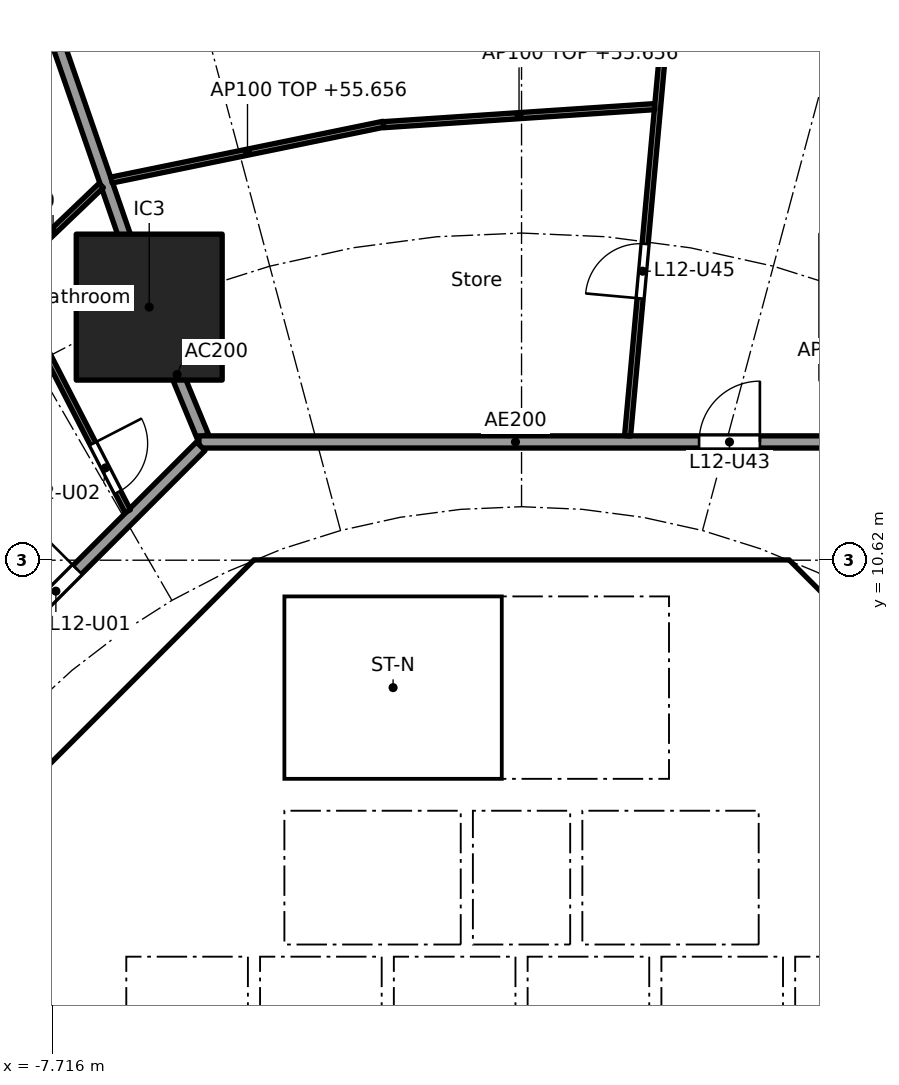
"""IFC4 building model, lengths in metres.
Left out: names, types, materials, properties, quantities, classifications, styles, units other than length and angle.
Written with IfcOpenShell. Run it as: python <this file> out.ifc"""

import sys

from ifc_helpers import new_model, si_unit, direction, frame, frame_2d, origin, origin_2d, place, context, subcontext, project, spatial, polyline, rectangle, outline, extrude, element, fill, save


model = new_model("IFC4")
c1 = context("Model", 3, precision=1e-05, world=origin(), true_north=direction((0.0, 1.0)))
c2 = subcontext(c1, "Body", "Model", "MODEL_VIEW")
j1 = project(units=[si_unit("LENGTHUNIT", "METRE"), si_unit("PLANEANGLEUNIT", "RADIAN")], contexts=[c1])
p1 = place(None, origin())
s1 = spatial("IfcSite", under=j1, at=p1, CompositionType="ELEMENT")
p2 = place(p1, origin())
s2 = spatial("IfcBuilding", under=s1, at=p2, CompositionType="ELEMENT")
p3 = place(p2, frame((0.0, 0.0, 52.9)))
s3 = spatial("IfcBuildingStorey", under=s2, at=p3, CompositionType="ELEMENT", Elevation=52.9)
p4 = place(p3, frame((-6.123, 14.782, 0.0), z_axis=(0.0, 0.0, 1.0), x_axis=(1.0, 0.0, 0.0)))
e1 = element("IfcColumn", 1, at=p4, inside=s3, PredefinedType="COLUMN", context=c2, shape_type="SweptSolid", body=[
    extrude(rectangle(XDim=2.4, YDim=2.4, at=origin_2d()), origin(), (0.0, 0.0, 1.0), 3.7),
])
p5 = place(p3, frame((9.988, 4.613, 0.0), z_axis=(0.0, 0.0, 1.0), x_axis=(-0.707106781187, 0.707106781187, 0.0)))
e2 = element("IfcWall", 2, at=p5, inside=s3, PredefinedType="SHEAR", context=c2, shape_type="SweptSolid", body=[
    extrude(rectangle(XDim=7.602, YDim=0.6, at=frame_2d((3.801, 0.0))), origin(), (0.0, 0.0, 1.0), 3.44),
])
p6 = place(p5, frame((3.201, 0.0, 0.0)))
e3 = element("IfcOpeningElement", 3, at=p6, cuts=e2, PredefinedType="OPENING", context=c2, shape_type="SweptSolid", body=[
    extrude(rectangle(XDim=1.2, YDim=2.1, at=frame_2d((0.6, 1.05))), frame((0.0, 0.31, 0.0), z_axis=(0.0, -1.0, 0.0), x_axis=(1.0, 0.0, 0.0)), (0.0, 0.0, 1.0), 0.62),
])
p7 = place(p3, frame((-4.613, 9.988, 0.0), z_axis=(0.0, 0.0, 1.0), x_axis=(-0.707106781187, -0.707106781187, 0.0)))
e4 = element("IfcWall", 4, at=p7, inside=s3, PredefinedType="SHEAR", context=c2, shape_type="SweptSolid", body=[
    extrude(rectangle(XDim=7.602, YDim=0.6, at=frame_2d((3.801, 0.0))), origin(), (0.0, 0.0, 1.0), 3.44),
])
p8 = place(p7, frame((0.351, 0.0, 0.0)))
e5 = element("IfcOpeningElement", 5, at=p8, cuts=e4, PredefinedType="OPENING", context=c2, shape_type="SweptSolid", body=[
    extrude(rectangle(XDim=1.1, YDim=2.1, at=frame_2d((0.55, 1.05))), frame((0.0, 0.31, 0.0), z_axis=(0.0, -1.0, 0.0), x_axis=(1.0, 0.0, 0.0)), (0.0, 0.0, 1.0), 0.62),
])
p9 = place(p3, frame((-5.8, 4.3, 0.0), z_axis=(0.0, 0.0, 1.0), x_axis=(0.0, 1.0, 0.0)))
e6 = element("IfcWall", 6, at=p9, inside=s3, PredefinedType="PARTITIONING", context=c2, shape_type="SweptSolid", body=[
    extrude(rectangle(XDim=3.927, YDim=0.15, at=frame_2d((1.963, 0.0))), origin(), (0.0, 0.0, 1.0), 3.44),
])
p10 = place(p9, frame((1.551, 0.0, 0.0)))
e7 = element("IfcOpeningElement", 7, at=p10, cuts=e6, PredefinedType="OPENING", context=c2, shape_type="SweptSolid", body=[
    extrude(rectangle(XDim=0.9, YDim=2.1, at=frame_2d((0.45, 1.05))), frame((0.0, 0.085, 0.0), z_axis=(0.0, -1.0, 0.0), x_axis=(1.0, 0.0, 0.0)), (0.0, 0.0, 1.0), 0.17),
])
p11 = place(p3, frame((4.0, 4.3, 0.0), z_axis=(0.0, 0.0, 1.0), x_axis=(0.0, 1.0, 0.0)))
e8 = element("IfcWall", 8, at=p11, inside=s3, PredefinedType="SOLIDWALL", context=c2, shape_type="SweptSolid", body=[
    extrude(rectangle(XDim=2.2, YDim=0.2, at=frame_2d((1.1, 0.0))), origin(), (0.0, 0.0, 1.0), 3.44),
])
p12 = place(p11, frame((0.55, 0.0, 0.0)))
e9 = element("IfcOpeningElement", 9, at=p12, cuts=e8, PredefinedType="OPENING", context=c2, shape_type="SweptSolid", body=[
    extrude(rectangle(XDim=1.1, YDim=2.1, at=frame_2d((0.55, 1.05))), frame((0.0, 0.11, 0.0), z_axis=(0.0, -1.0, 0.0), x_axis=(1.0, 0.0, 0.0)), (0.0, 0.0, 1.0), 0.22),
])
p13 = place(p3, frame((-4.0, 4.3, 0.0), z_axis=(0.0, 0.0, 1.0), x_axis=(0.0, 1.0, 0.0)))
e10 = element("IfcWall", 10, at=p13, inside=s3, PredefinedType="SOLIDWALL", context=c2, shape_type="SweptSolid", body=[
    extrude(rectangle(XDim=2.2, YDim=0.2, at=frame_2d((1.1, 0.0))), origin(), (0.0, 0.0, 1.0), 3.44),
])
p14 = place(p13, frame((0.55, 0.0, 0.0)))
e11 = element("IfcOpeningElement", 11, at=p14, cuts=e10, PredefinedType="OPENING", context=c2, shape_type="SweptSolid", body=[
    extrude(rectangle(XDim=1.1, YDim=2.1, at=frame_2d((0.55, 1.05))), frame((0.0, 0.11, 0.0), z_axis=(0.0, -1.0, 0.0), x_axis=(1.0, 0.0, 0.0)), (0.0, 0.0, 1.0), 0.22),
])
p15 = place(p3, frame((4.0, 7.025, 0.0), z_axis=(0.0, 0.0, 1.0), x_axis=(0.0, 1.0, 0.0)))
e12 = element("IfcWall", 12, at=p15, inside=s3, PredefinedType="SOLIDWALL", context=c2, shape_type="SweptSolid", body=[
    extrude(rectangle(XDim=3.0, YDim=0.2, at=frame_2d((1.5, 0.0))), origin(), (0.0, 0.0, 1.0), 3.44),
])
p16 = place(p15, frame((0.925, 0.0, 0.0)))
e13 = element("IfcOpeningElement", 13, at=p16, cuts=e12, PredefinedType="OPENING", context=c2, shape_type="SweptSolid", body=[
    extrude(rectangle(XDim=1.1, YDim=2.1, at=frame_2d((0.55, 1.05))), frame((0.0, 0.11, 0.0), z_axis=(0.0, -1.0, 0.0), x_axis=(1.0, 0.0, 0.0)), (0.0, 0.0, 1.0), 0.22),
])
p17 = place(p3, origin())
e14 = element("IfcWall", 14, at=p17, inside=s3, PredefinedType="SHEAR", context=c2, shape_type="SweptSolid", body=[
    extrude(outline(polyline([(-4.152, 10.025), (-4.401, 9.776), (-4.825, 10.2), (-4.401, 10.625), (4.401, 10.625), (4.825, 10.2), (4.401, 9.776), (4.152, 10.025), (-4.152, 10.025)])), origin(), (0.0, 0.0, 1.0), 3.44),
])
for number, where, z_axis, x_axis in (
    (15, (-0.9, 4.3, 0.0), (0.0, 0.0, 1.0), (0.0, 1.0, 0.0)),
    (16, (0.9, 4.3, 0.0), (0.0, 0.0, 1.0), (0.0, 1.0, 0.0)),
):
    element("IfcWall", number, at=place(p3, frame(where, z_axis=z_axis, x_axis=x_axis)), inside=s3, PredefinedType="SOLIDWALL", context=c2, shape_type="SweptSolid", body=[
        extrude(rectangle(XDim=2.2, YDim=0.2, at=frame_2d((1.1, 0.0))), origin(), (0.0, 0.0, 1.0), 3.44),
    ])
p18 = place(p3, origin())
e17 = element("IfcWall", 17, at=p18, inside=s3, PredefinedType="SOLIDWALL", context=c2, shape_type="SweptSolid", body=[
    extrude(outline(polyline([(-6.5, 2.1), (-6.7, 2.1), (-6.7, 4.3), (6.7, 4.3), (6.7, 2.1), (6.5, 2.1), (6.5, 4.1), (4.5, 4.1), (4.5, 2.1), (4.3, 2.1), (4.3, 4.1), (2.3, 4.1), (2.3, 2.1), (2.1, 2.1), (2.1, 4.1), (0.1, 4.1), (0.1, 2.1), (-0.1, 2.1), (-0.1, 4.1), (-2.1, 4.1), (-2.1, 2.1), (-2.3, 2.1), (-2.3, 4.1), (-4.3, 4.1), (-4.3, 2.1), (-4.5, 2.1), (-4.5, 4.1), (-6.5, 4.1), (-6.5, 2.1)])), origin(), (0.0, 0.0, 1.0), 3.44),
])
p19 = place(p3, frame((-10.025, 4.0, 0.0), z_axis=(0.0, 0.0, 1.0), x_axis=(1.0, 0.0, 0.0)))
e18 = element("IfcWall", 18, at=p19, inside=s3, PredefinedType="PARTITIONING", context=c2, shape_type="SweptSolid", body=[
    extrude(rectangle(XDim=3.325, YDim=0.2, at=frame_2d((1.662, 0.0))), origin(), (0.0, 0.0, 1.0), 3.44),
])
p20 = place(p3, origin())
e19 = element("IfcWall", 19, at=p20, inside=s3, PredefinedType="SOLIDWALL", context=c2, shape_type="SweptSolid", body=[
    extrude(outline(polyline([(-3.9, 7.025), (-4.1, 7.025), (-4.1, 10.025), (-3.9, 10.025), (-3.9, 7.025)])), origin(), (0.0, 0.0, 1.0), 3.44),
])
p21 = place(p3, origin())
e20 = element("IfcWall", 20, at=p21, inside=s3, PredefinedType="SOLIDWALL", context=c2, shape_type="SweptSolid", body=[
    extrude(outline(polyline([(4.1, 6.5), (-4.1, 6.5), (-4.1, 7.025), (4.1, 7.025), (4.1, 6.5)])), origin(), (0.0, 0.0, 1.0), 3.44),
])
p22 = place(p3, frame((-5.243, 12.657, 0.0), z_axis=(0.0, 0.0, 1.0), x_axis=(-0.382668627144, 0.923885664896, 0.0)))
e21 = element("IfcWall", 21, at=p22, inside=s3, PredefinedType="PARTITIONING", context=c2, shape_type="SweptSolid", body=[
    extrude(rectangle(XDim=2.2, YDim=0.2, at=frame_2d((1.1, 0.0))), origin(), (0.0, 0.0, 1.0), 3.44),
])
p23 = place(p3, frame((-6.139, 14.829, 0.0), z_axis=(0.0, 0.0, 1.0), x_axis=(-0.327178799566, 0.944962450637, 0.0)))
e22 = element("IfcWall", 22, at=p23, inside=s3, PredefinedType="PARTITIONING", context=c2, shape_type="SweptSolid", body=[
    extrude(rectangle(XDim=13.517, YDim=0.2, at=frame_2d((6.759, 0.0))), origin(), (0.0, 0.0, 1.0), 2.756),
])
p24 = place(p3, frame((5.104, 12.565, 0.0), z_axis=(0.0, 0.0, 1.0), x_axis=(-1.0, 0.0, 0.0)))
e23 = element("IfcWall", 23, at=p24, inside=s3, PredefinedType="PARTITIONING", context=c2, shape_type="SweptSolid", body=[
    extrude(rectangle(XDim=10.409, YDim=0.2, at=frame_2d((5.205, 0.0))), origin(), (0.0, 0.0, 1.0), 3.44),
])
p25 = place(p24, frame((1.185, 0.0, 0.0)))
e24 = element("IfcOpeningElement", 24, at=p25, cuts=e23, PredefinedType="OPENING", context=c2, shape_type="SweptSolid", body=[
    extrude(rectangle(XDim=1.0, YDim=2.1, at=frame_2d((0.5, 1.05))), frame((0.0, 0.11, 0.0), z_axis=(0.0, -1.0, 0.0), x_axis=(1.0, 0.0, 0.0)), (0.0, 0.0, 1.0), 0.22),
])
p26 = place(p3, frame((-5.275, 12.494, 0.0), z_axis=(0.0, 0.0, 1.0), x_axis=(-0.707106781187, -0.707106781187, 0.0)))
e25 = element("IfcWall", 25, at=p26, inside=s3, PredefinedType="PARTITIONING", context=c2, shape_type="SweptSolid", body=[
    extrude(rectangle(XDim=10.209, YDim=0.2, at=frame_2d((5.104, 0.0))), origin(), (0.0, 0.0, 1.0), 3.44),
])
p27 = place(p26, frame((2.87, 0.0, 0.0)))
e26 = element("IfcOpeningElement", 26, at=p27, cuts=e25, PredefinedType="OPENING", context=c2, shape_type="SweptSolid", body=[
    extrude(rectangle(XDim=1.0, YDim=2.1, at=frame_2d((0.5, 1.05))), frame((0.0, 0.11, 0.0), z_axis=(0.0, -1.0, 0.0), x_axis=(1.0, 0.0, 0.0)), (0.0, 0.0, 1.0), 0.22),
])
p28 = place(p3, frame((1.744, 12.664, 0.0), z_axis=(0.0, 0.0, 1.0), x_axis=(0.090893639596, 0.995860605849, 0.0)))
e27 = element("IfcWall", 27, at=p28, inside=s3, PredefinedType="PARTITIONING", context=c2, shape_type="SweptSolid", body=[
    extrude(rectangle(XDim=19.374, YDim=0.1, at=frame_2d((9.687, 0.0))), origin(), (0.0, 0.0, 1.0), 2.687),
])
p29 = place(p28, frame((2.27, 0.0, 0.0)))
e28 = element("IfcOpeningElement", 28, at=p29, cuts=e27, PredefinedType="OPENING", context=c2, shape_type="SweptSolid", body=[
    extrude(rectangle(XDim=0.9, YDim=2.1, at=frame_2d((0.45, 1.05))), frame((0.0, 0.06, 0.0), z_axis=(0.0, -1.0, 0.0), x_axis=(1.0, 0.0, 0.0)), (0.0, 0.0, 1.0), 0.12),
])
p30 = place(p28, frame((8.582, 0.0, 0.0)))
e29 = element("IfcOpeningElement", 29, at=p30, cuts=e27, PredefinedType="OPENING", context=c2, shape_type="SweptSolid", body=[
    extrude(rectangle(XDim=0.9, YDim=2.1, at=frame_2d((0.45, 1.05))), frame((0.0, 0.06, 0.0), z_axis=(0.0, -1.0, 0.0), x_axis=(1.0, 0.0, 0.0)), (0.0, 0.0, 1.0), 0.12),
])
p31 = place(p28, frame((15.548, 0.0, 0.0)))
e30 = element("IfcOpeningElement", 30, at=p31, cuts=e27, PredefinedType="OPENING", context=c2, shape_type="SweptSolid", body=[
    extrude(rectangle(XDim=0.9, YDim=2.1, at=frame_2d((0.45, 1.05))), frame((0.0, 0.06, 0.0), z_axis=(0.0, -1.0, 0.0), x_axis=(1.0, 0.0, 0.0)), (0.0, 0.0, 1.0), 0.12),
])
p32 = place(p3, frame((2.188, 18.079, 0.0), z_axis=(0.0, 0.0, 1.0), x_axis=(-0.997791437766, -0.066424744789, 0.0)))
e31 = element("IfcWall", 31, at=p32, inside=s3, PredefinedType="PARTITIONING", context=c2, shape_type="SweptSolid", body=[
    extrude(rectangle(XDim=4.469, YDim=0.1, at=frame_2d((2.235, 0.0))), origin(), (0.0, 0.0, 1.0), 2.756),
])
p33 = place(p3, frame((-2.272, 17.789, 0.0), z_axis=(0.0, 0.0, 1.0), x_axis=(-0.979595137747, -0.200981009307, 0.0)))
e32 = element("IfcWall", 32, at=p33, inside=s3, PredefinedType="PARTITIONING", context=c2, shape_type="SweptSolid", body=[
    extrude(rectangle(XDim=4.562, YDim=0.1, at=frame_2d((2.281, 0.0))), origin(), (0.0, 0.0, 1.0), 2.756),
])
p34 = place(p3, frame((-6.912, 16.782, 0.0), z_axis=(0.0, 0.0, 1.0), x_axis=(-0.722789289931, -0.691068478778, 0.0)))
e33 = element("IfcWall", 33, at=p34, inside=s3, PredefinedType="PARTITIONING", context=c2, shape_type="SweptSolid", body=[
    extrude(rectangle(XDim=2.194, YDim=0.1, at=frame_2d((1.097, 0.0))), origin(), (0.0, 0.0, 1.0), 3.44),
])
p35 = place(p3, frame((-6.477, 11.427, 0.0), z_axis=(0.0, 0.0, 1.0), x_axis=(-0.457464037982, 0.889228122561, 0.0)))
e34 = element("IfcWall", 34, at=p35, inside=s3, PredefinedType="PARTITIONING", context=c2, shape_type="SweptSolid", body=[
    extrude(rectangle(XDim=10.032, YDim=0.1, at=frame_2d((5.016, 0.0))), origin(), (0.0, 0.0, 1.0), 2.687),
])
p36 = place(p35, frame((0.35, 0.0, 0.0)))
e35 = element("IfcOpeningElement", 35, at=p36, cuts=e34, PredefinedType="OPENING", context=c2, shape_type="SweptSolid", body=[
    extrude(rectangle(XDim=0.9, YDim=2.1, at=frame_2d((0.45, 1.05))), frame((0.0, 0.06, 0.0), z_axis=(0.0, -1.0, 0.0), x_axis=(1.0, 0.0, 0.0)), (0.0, 0.0, 1.0), 0.12),
])
p37 = place(p35, frame((6.735, 0.0, 0.0)))
e36 = element("IfcOpeningElement", 36, at=p37, cuts=e34, PredefinedType="OPENING", context=c2, shape_type="SweptSolid", body=[
    extrude(rectangle(XDim=0.9, YDim=2.1, at=frame_2d((0.45, 1.05))), frame((0.0, 0.06, 0.0), z_axis=(0.0, -1.0, 0.0), x_axis=(1.0, 0.0, 0.0)), (0.0, 0.0, 1.0), 0.12),
])
p38 = place(p12, origin())
e37 = element("IfcDoor", 37, at=p38, inside=s3, OperationType="DOUBLE_DOOR_SLIDING", PredefinedType="DOOR", context=c2, shape_type="SweptSolid", body=[
    extrude(rectangle(XDim=1.1, YDim=2.1, at=frame_2d((0.55, 1.05))), frame((0.0, 0.025, 0.0), z_axis=(0.0, -1.0, 0.0), x_axis=(1.0, 0.0, 0.0)), (0.0, 0.0, 1.0), 0.05),
])
fill(e9, e37)
p39 = place(p14, origin())
e38 = element("IfcDoor", 38, at=p39, inside=s3, OperationType="DOUBLE_DOOR_SLIDING", PredefinedType="DOOR", context=c2, shape_type="SweptSolid", body=[
    extrude(rectangle(XDim=1.1, YDim=2.1, at=frame_2d((0.55, 1.05))), frame((0.0, 0.025, 0.0), z_axis=(0.0, -1.0, 0.0), x_axis=(1.0, 0.0, 0.0)), (0.0, 0.0, 1.0), 0.05),
])
fill(e11, e38)
p40 = place(p16, origin())
e39 = element("IfcDoor", 39, at=p40, inside=s3, OperationType="SINGLE_SWING_RIGHT", PredefinedType="DOOR", context=c2, shape_type="SweptSolid", body=[
    extrude(rectangle(XDim=1.1, YDim=2.1, at=frame_2d((0.55, 1.05))), frame((0.0, 0.025, 0.0), z_axis=(0.0, -1.0, 0.0), x_axis=(1.0, 0.0, 0.0)), (0.0, 0.0, 1.0), 0.05),
])
fill(e13, e39)
p41 = place(p10, origin())
e40 = element("IfcDoor", 40, at=p41, inside=s3, OperationType="SINGLE_SWING_LEFT", PredefinedType="DOOR", context=c2, shape_type="SweptSolid", body=[
    extrude(rectangle(XDim=0.9, YDim=2.1, at=frame_2d((0.45, 1.05))), frame((0.0, 0.025, 0.0), z_axis=(0.0, -1.0, 0.0), x_axis=(1.0, 0.0, 0.0)), (0.0, 0.0, 1.0), 0.05),
])
fill(e7, e40)
p42 = place(p8, origin())
e41 = element("IfcDoor", 41, at=p42, inside=s3, OperationType="SINGLE_SWING_LEFT", PredefinedType="DOOR", context=c2, shape_type="SweptSolid", body=[
    extrude(rectangle(XDim=1.1, YDim=2.1, at=frame_2d((0.55, 1.05))), frame((0.0, 0.025, 0.0), z_axis=(0.0, -1.0, 0.0), x_axis=(1.0, 0.0, 0.0)), (0.0, 0.0, 1.0), 0.05),
])
fill(e5, e41)
p43 = place(p27, frame((1.0, 0.0, 0.0), x_axis=(-1.0, 0.0, 0.0)))
e42 = element("IfcDoor", 42, at=p43, inside=s3, OperationType="SINGLE_SWING_RIGHT", PredefinedType="DOOR", context=c2, shape_type="SweptSolid", body=[
    extrude(rectangle(XDim=1.0, YDim=2.1, at=frame_2d((0.5, 1.05))), frame((0.0, 0.025, 0.0), z_axis=(0.0, -1.0, 0.0), x_axis=(1.0, 0.0, 0.0)), (0.0, 0.0, 1.0), 0.05),
])
fill(e26, e42)
p44 = place(p36, frame((0.9, 0.0, 0.0), x_axis=(-1.0, 0.0, 0.0)))
e43 = element("IfcDoor", 43, at=p44, inside=s3, OperationType="SINGLE_SWING_LEFT", PredefinedType="DOOR", context=c2, shape_type="SweptSolid", body=[
    extrude(rectangle(XDim=0.9, YDim=2.1, at=frame_2d((0.45, 1.05))), frame((0.0, 0.025, 0.0), z_axis=(0.0, -1.0, 0.0), x_axis=(1.0, 0.0, 0.0)), (0.0, 0.0, 1.0), 0.05),
])
fill(e35, e43)
p45 = place(p25, frame((1.0, 0.0, 0.0), x_axis=(-1.0, 0.0, 0.0)))
e44 = element("IfcDoor", 44, at=p45, inside=s3, OperationType="SINGLE_SWING_RIGHT", PredefinedType="DOOR", context=c2, shape_type="SweptSolid", body=[
    extrude(rectangle(XDim=1.0, YDim=2.1, at=frame_2d((0.5, 1.05))), frame((0.0, 0.025, 0.0), z_axis=(0.0, -1.0, 0.0), x_axis=(1.0, 0.0, 0.0)), (0.0, 0.0, 1.0), 0.05),
])
fill(e24, e44)
p46 = place(p29, origin())
e45 = element("IfcDoor", 45, at=p46, inside=s3, OperationType="SINGLE_SWING_LEFT", PredefinedType="DOOR", context=c2, shape_type="SweptSolid", body=[
    extrude(rectangle(XDim=0.9, YDim=2.1, at=frame_2d((0.45, 1.05))), frame((0.0, 0.025, 0.0), z_axis=(0.0, -1.0, 0.0), x_axis=(1.0, 0.0, 0.0)), (0.0, 0.0, 1.0), 0.05),
])
fill(e28, e45)
save(model, sys.argv[1])
